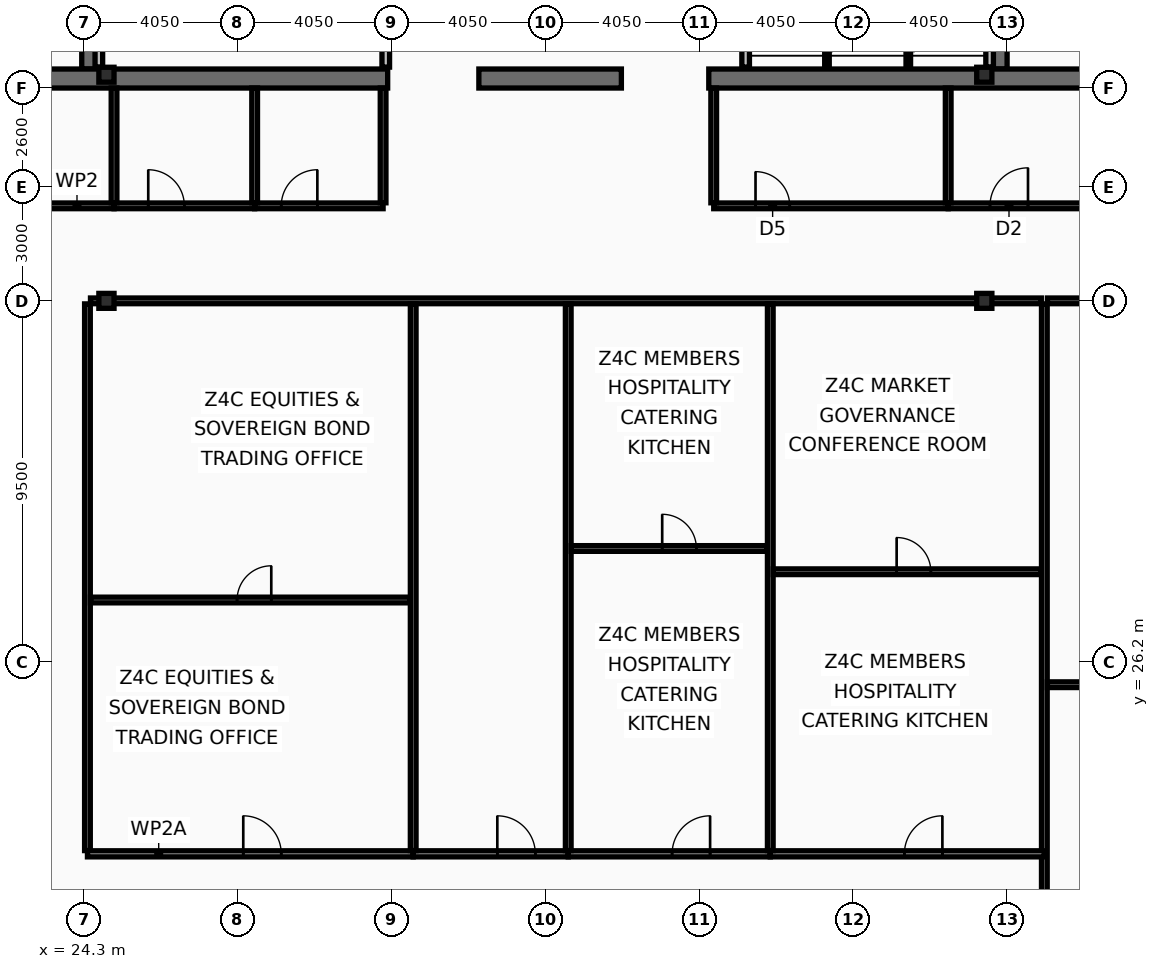
"""IFC4 building model, lengths in metres.
Left out: names, types, materials, properties, quantities, classifications, styles, units other than length and angle.
Written with IfcOpenShell. Run it as: python <this file> out.ifc"""

import sys

from ifc_helpers import new_model, si_unit, direction, frame, frame_2d, origin, origin_2d, place, context, subcontext, project, spatial, rectangle, i_section, extrude, element, fill, save


model = new_model("IFC4")
c1 = context("Model", 3, precision=1e-05, world=origin(), true_north=direction((0.0, 1.0)))
c2 = subcontext(c1, "Body", "Model", "MODEL_VIEW")
j1 = project(units=[si_unit("LENGTHUNIT", "METRE"), si_unit("PLANEANGLEUNIT", "RADIAN")], contexts=[c1])
p1 = place(None, origin())
s1 = spatial("IfcSite", under=j1, at=p1, CompositionType="ELEMENT")
p2 = place(p1, origin())
s2 = spatial("IfcBuilding", under=s1, at=p2, CompositionType="ELEMENT")
p3 = place(p2, frame((0.0, 0.0, 321.8)))
s3 = spatial("IfcBuildingStorey", under=s2, at=p3, CompositionType="ELEMENT", Elevation=321.8)
for number, where, z_axis, x_axis in (
    (1, (24.45, 41.8, 0.0), (0.0, 0.0, 1.0), (0.0, 1.0, 0.0)),
    (2, (48.4, 41.8, 0.0), (0.0, 0.0, 1.0), (0.0, 1.0, 0.0)),
):
    element("IfcWall", number, at=place(p3, frame(where, z_axis=z_axis, x_axis=x_axis)), inside=s3, PredefinedType="SHEAR", context=c2, shape_type="SweptSolid", body=[
        extrude(rectangle(XDim=11.4, YDim=0.4, at=frame_2d((5.7, 0.0))), origin(), (0.0, 0.0, 1.0), 3.44),
    ])
p4 = place(p3, frame((32.3, 41.55, 0.0), z_axis=(0.0, 0.0, 1.0), x_axis=(-1.0, 0.0, 0.0)))
e3 = element("IfcWall", 3, at=p4, inside=s3, PredefinedType="SHEAR", context=c2, shape_type="SweptSolid", body=[
    extrude(rectangle(XDim=11.45, YDim=0.5, at=frame_2d((5.725, 0.0))), origin(), (0.0, 0.0, 1.0), 3.44),
])
p5 = place(p3, frame((38.45, 41.55, 0.0), z_axis=(0.0, 0.0, 1.0), x_axis=(-1.0, 0.0, 0.0)))
e4 = element("IfcWall", 4, at=p5, inside=s3, PredefinedType="SHEAR", context=c2, shape_type="SweptSolid", body=[
    extrude(rectangle(XDim=3.75, YDim=0.5, at=frame_2d((1.875, 0.0))), origin(), (0.0, 0.0, 1.0), 3.44),
])
p6 = place(p3, frame((52.05, 41.55, 0.0), z_axis=(0.0, 0.0, 1.0), x_axis=(-1.0, 0.0, 0.0)))
e5 = element("IfcWall", 5, at=p6, inside=s3, PredefinedType="SHEAR", context=c2, shape_type="SweptSolid", body=[
    extrude(rectangle(XDim=11.3, YDim=0.5, at=frame_2d((5.65, 0.0))), origin(), (0.0, 0.0, 1.0), 3.44),
])
for number, where, z_axis, x_axis in (
    (6, (24.9, 35.7, 0.0), (0.0, 0.0, 1.0), (1.0, 0.0, 0.0)),
    (7, (24.9, 41.65, 0.0), (0.0, 0.0, 1.0), (1.0, 0.0, 0.0)),
    (8, (48.0, 35.7, 0.0), (0.0, 0.0, 1.0), (1.0, 0.0, 0.0)),
    (9, (48.0, 41.65, 0.0), (0.0, 0.0, 1.0), (1.0, 0.0, 0.0)),
):
    element("IfcColumn", number, at=place(p3, frame(where, z_axis=z_axis, x_axis=x_axis)), inside=s3, PredefinedType="COLUMN", context=c2, shape_type="SweptSolid", body=[
        extrude(i_section(OverallWidth=0.399, OverallDepth=0.393, WebThickness=0.023, FlangeThickness=0.037, at=origin_2d()), origin(), (0.0, 0.0, 1.0), 3.6),
    ])
for number, where, z_axis, x_axis in (
    (10, (24.7, 41.85, 0.0), (0.0, 0.0, 1.0), (0.0, 1.0, 0.0)),
    (11, (32.25, 41.85, 0.0), (0.0, 0.0, 1.0), (0.0, 1.0, 0.0)),
):
    element("IfcWall", number, at=place(p3, frame(where, z_axis=z_axis, x_axis=x_axis)), inside=s3, PredefinedType="PARTITIONING", context=c2, shape_type="SweptSolid", body=[
        extrude(rectangle(XDim=2.395, YDim=0.2, at=frame_2d((1.198, 0.0))), origin(), (0.0, 0.0, 1.0), 3.44),
    ])
for number, where, z_axis, x_axis in (
    (12, (41.72, 41.85, 0.0), (0.0, 0.0, 1.0), (0.0, 1.0, 0.0)),
    (13, (48.14, 41.85, 0.0), (0.0, 0.0, 1.0), (0.0, 1.0, 0.0)),
):
    element("IfcWall", number, at=place(p3, frame(where, z_axis=z_axis, x_axis=x_axis)), inside=s3, PredefinedType="PARTITIONING", context=c2, shape_type="SweptSolid", body=[
        extrude(rectangle(XDim=2.4, YDim=0.2, at=frame_2d((1.2, 0.0))), origin(), (0.0, 0.0, 1.0), 3.44),
    ])
for number, where, z_axis, x_axis in (
    (14, (43.86, 41.85, 0.0), (0.0, 0.0, 1.0), (0.0, 1.0, 0.0)),
    (15, (46.0, 41.85, 0.0), (0.0, 0.0, 1.0), (0.0, 1.0, 0.0)),
):
    element("IfcWall", number, at=place(p3, frame(where, z_axis=z_axis, x_axis=x_axis)), inside=s3, PredefinedType="PARTITIONING", context=c2, shape_type="SweptSolid", body=[
        extrude(rectangle(XDim=2.4, YDim=0.12, at=frame_2d((1.2, 0.0))), origin(), (0.0, 0.0, 1.0), 3.44),
    ])
p7 = place(p3, frame((20.95, 38.2, 0.0), z_axis=(0.0, 0.0, 1.0), x_axis=(1.0, 0.0, 0.0)))
e16 = element("IfcWall", 16, at=p7, inside=s3, PredefinedType="PARTITIONING", context=c2, shape_type="SweptSolid", body=[
    extrude(rectangle(XDim=4.15, YDim=0.15, at=frame_2d((2.075, 0.0))), origin(), (0.0, 0.0, 1.0), 2.83),
])
p8 = place(p7, frame((0.9, 0.0, 0.0)))
e17 = element("IfcOpeningElement", 17, at=p8, cuts=e16, PredefinedType="OPENING", context=c2, shape_type="SweptSolid", body=[
    extrude(rectangle(XDim=0.95, YDim=2.05, at=frame_2d((0.475, 1.025))), frame((0.0, 0.085, 0.0), z_axis=(0.0, -1.0, 0.0), x_axis=(1.0, 0.0, 0.0)), (0.0, 0.0, 1.0), 0.17),
])
p9 = place(p3, frame((25.1, 38.2, 0.0), z_axis=(0.0, 0.0, 1.0), x_axis=(1.0, 0.0, 0.0)))
e18 = element("IfcWall", 18, at=p9, inside=s3, PredefinedType="PARTITIONING", context=c2, shape_type="SweptSolid", body=[
    extrude(rectangle(XDim=3.7, YDim=0.15, at=frame_2d((1.85, 0.0))), origin(), (0.0, 0.0, 1.0), 2.83),
])
p10 = place(p9, frame((0.9, 0.0, 0.0)))
e19 = element("IfcOpeningElement", 19, at=p10, cuts=e18, PredefinedType="OPENING", context=c2, shape_type="SweptSolid", body=[
    extrude(rectangle(XDim=0.95, YDim=2.05, at=frame_2d((0.475, 1.025))), frame((0.0, 0.085, 0.0), z_axis=(0.0, -1.0, 0.0), x_axis=(1.0, 0.0, 0.0)), (0.0, 0.0, 1.0), 0.17),
])
p11 = place(p3, frame((28.8, 38.2, 0.0), z_axis=(0.0, 0.0, 1.0), x_axis=(1.0, 0.0, 0.0)))
e20 = element("IfcWall", 20, at=p11, inside=s3, PredefinedType="PARTITIONING", context=c2, shape_type="SweptSolid", body=[
    extrude(rectangle(XDim=3.38, YDim=0.15, at=frame_2d((1.69, 0.0))), origin(), (0.0, 0.0, 1.0), 3.44),
])
p12 = place(p11, frame((0.7, 0.0, 0.0)))
e21 = element("IfcOpeningElement", 21, at=p12, cuts=e20, PredefinedType="OPENING", context=c2, shape_type="SweptSolid", body=[
    extrude(rectangle(XDim=0.95, YDim=2.05, at=frame_2d((0.475, 1.025))), frame((0.0, 0.085, 0.0), z_axis=(0.0, -1.0, 0.0), x_axis=(1.0, 0.0, 0.0)), (0.0, 0.0, 1.0), 0.17),
])
p13 = place(p3, frame((25.1, 38.28, 0.0), z_axis=(0.0, 0.0, 1.0), x_axis=(0.0, 1.0, 0.0)))
e22 = element("IfcWall", 22, at=p13, inside=s3, PredefinedType="PARTITIONING", context=c2, shape_type="SweptSolid", body=[
    extrude(rectangle(XDim=3.02, YDim=0.15, at=frame_2d((1.51, 0.0))), origin(), (0.0, 0.0, 1.0), 2.83),
])
for number, where, z_axis, x_axis in (
    (23, (28.8, 38.28, 0.0), (0.0, 0.0, 1.0), (0.0, 1.0, 0.0)),
    (24, (32.18, 38.28, 0.0), (0.0, 0.0, 1.0), (0.0, 1.0, 0.0)),
):
    element("IfcWall", number, at=place(p3, frame(where, z_axis=z_axis, x_axis=x_axis)), inside=s3, PredefinedType="PARTITIONING", context=c2, shape_type="SweptSolid", body=[
        extrude(rectangle(XDim=3.02, YDim=0.15, at=frame_2d((1.51, 0.0))), origin(), (0.0, 0.0, 1.0), 3.44),
    ])
p14 = place(p3, frame((40.88, 38.2, 0.0), z_axis=(0.0, 0.0, 1.0), x_axis=(1.0, 0.0, 0.0)))
e25 = element("IfcWall", 25, at=p14, inside=s3, PredefinedType="PARTITIONING", context=c2, shape_type="SweptSolid", body=[
    extrude(rectangle(XDim=6.17, YDim=0.15, at=frame_2d((3.085, 0.0))), origin(), (0.0, 0.0, 1.0), 3.44),
])
p15 = place(p14, frame((1.1, 0.0, 0.0)))
e26 = element("IfcOpeningElement", 26, at=p15, cuts=e25, PredefinedType="OPENING", context=c2, shape_type="SweptSolid", body=[
    extrude(rectangle(XDim=0.9, YDim=2.05, at=frame_2d((0.45, 1.025))), frame((0.0, 0.085, 0.0), z_axis=(0.0, -1.0, 0.0), x_axis=(1.0, 0.0, 0.0)), (0.0, 0.0, 1.0), 0.17),
])
p16 = place(p3, frame((47.05, 38.2, 0.0), z_axis=(0.0, 0.0, 1.0), x_axis=(1.0, 0.0, 0.0)))
e27 = element("IfcWall", 27, at=p16, inside=s3, PredefinedType="PARTITIONING", context=c2, shape_type="SweptSolid", body=[
    extrude(rectangle(XDim=4.9, YDim=0.15, at=frame_2d((2.45, 0.0))), origin(), (0.0, 0.0, 1.0), 2.83),
])
p17 = place(p16, frame((1.1, 0.0, 0.0)))
e28 = element("IfcOpeningElement", 28, at=p17, cuts=e27, PredefinedType="OPENING", context=c2, shape_type="SweptSolid", body=[
    extrude(rectangle(XDim=1.0, YDim=2.05, at=frame_2d((0.5, 1.025))), frame((0.0, 0.085, 0.0), z_axis=(0.0, -1.0, 0.0), x_axis=(1.0, 0.0, 0.0)), (0.0, 0.0, 1.0), 0.17),
])
for number, where, z_axis, x_axis in (
    (29, (40.88, 38.28, 0.0), (0.0, 0.0, 1.0), (0.0, 1.0, 0.0)),
    (30, (47.05, 38.28, 0.0), (0.0, 0.0, 1.0), (0.0, 1.0, 0.0)),
):
    element("IfcWall", number, at=place(p3, frame(where, z_axis=z_axis, x_axis=x_axis)), inside=s3, PredefinedType="PARTITIONING", context=c2, shape_type="SweptSolid", body=[
        extrude(rectangle(XDim=3.02, YDim=0.15, at=frame_2d((1.51, 0.0))), origin(), (0.0, 0.0, 1.0), 3.44),
    ])
p18 = place(p3, frame((24.4, 21.235, 0.0), z_axis=(0.0, 0.0, 1.0), x_axis=(0.0, 1.0, 0.0)))
e31 = element("IfcWall", 31, at=p18, inside=s3, PredefinedType="PARTITIONING", context=c2, shape_type="SweptSolid", body=[
    extrude(rectangle(XDim=14.385, YDim=0.15, at=frame_2d((7.192, 0.0))), origin(), (0.0, 0.0, 1.0), 2.83),
])
p19 = place(p3, frame((49.58, 10.665, 0.0), z_axis=(0.0, 0.0, 1.0), x_axis=(0.0, 1.0, 0.0)))
e32 = element("IfcWall", 32, at=p19, inside=s3, PredefinedType="PARTITIONING", context=c2, shape_type="SweptSolid", body=[
    extrude(rectangle(XDim=24.955, YDim=0.15, at=frame_2d((12.478, 0.0))), origin(), (0.0, 0.0, 1.0), 3.07),
])
p20 = place(p19, frame((3.2, 0.0, 0.0)))
e33 = element("IfcOpeningElement", 33, at=p20, cuts=e32, PredefinedType="OPENING", context=c2, shape_type="SweptSolid", body=[
    extrude(rectangle(XDim=1.1, YDim=2.1, at=frame_2d((0.55, 1.05))), frame((0.0, 0.085, 0.0), z_axis=(0.0, -1.0, 0.0), x_axis=(1.0, 0.0, 0.0)), (0.0, 0.0, 1.0), 0.17),
])
p21 = place(p3, frame((24.48, 35.7, 0.0), z_axis=(0.0, 0.0, 1.0), x_axis=(1.0, 0.0, 0.0)))
e34 = element("IfcWall", 34, at=p21, inside=s3, PredefinedType="PARTITIONING", context=c2, shape_type="SweptSolid", body=[
    extrude(rectangle(XDim=25.02, YDim=0.15, at=frame_2d((12.51, 0.0))), origin(), (0.0, 0.0, 1.0), 2.83),
])
p22 = place(p3, frame((49.66, 35.7, 0.0), z_axis=(0.0, 0.0, 1.0), x_axis=(1.0, 0.0, 0.0)))
e35 = element("IfcWall", 35, at=p22, inside=s3, PredefinedType="PARTITIONING", context=c2, shape_type="SweptSolid", body=[
    extrude(rectangle(XDim=11.145, YDim=0.15, at=frame_2d((5.573, 0.0))), origin(), (0.0, 0.0, 1.0), 2.83),
])
p23 = place(p22, frame((2.2, 0.0, 0.0)))
e36 = element("IfcOpeningElement", 36, at=p23, cuts=e35, PredefinedType="OPENING", context=c2, shape_type="SweptSolid", body=[
    extrude(rectangle(XDim=1.0, YDim=2.05, at=frame_2d((0.5, 1.025))), frame((0.0, 0.085, 0.0), z_axis=(0.0, -1.0, 0.0), x_axis=(1.0, 0.0, 0.0)), (0.0, 0.0, 1.0), 0.17),
])
p24 = place(p3, frame((49.66, 25.6, 0.0), z_axis=(0.0, 0.0, 1.0), x_axis=(1.0, 0.0, 0.0)))
e37 = element("IfcWall", 37, at=p24, inside=s3, PredefinedType="PARTITIONING", context=c2, shape_type="SweptSolid", body=[
    extrude(rectangle(XDim=11.145, YDim=0.15, at=frame_2d((5.573, 0.0))), origin(), (0.0, 0.0, 1.0), 2.83),
])
p25 = place(p24, frame((2.2, 0.0, 0.0)))
e38 = element("IfcOpeningElement", 38, at=p25, cuts=e37, PredefinedType="OPENING", context=c2, shape_type="SweptSolid", body=[
    extrude(rectangle(XDim=0.9, YDim=2.05, at=frame_2d((0.45, 1.025))), frame((0.0, 0.085, 0.0), z_axis=(0.0, -1.0, 0.0), x_axis=(1.0, 0.0, 0.0)), (0.0, 0.0, 1.0), 0.17),
])
p26 = place(p3, frame((24.4, 21.15, 0.0), z_axis=(0.0, 0.0, 1.0), x_axis=(1.0, 0.0, 0.0)))
e39 = element("IfcWall", 39, at=p26, inside=s3, PredefinedType="PARTITIONING", context=c2, shape_type="SweptSolid", body=[
    extrude(rectangle(XDim=8.572, YDim=0.16, at=frame_2d((4.286, 0.0))), origin(), (0.0, 0.0, 1.0), 2.83),
])
p27 = place(p26, frame((4.1, 0.0, 0.0)))
e40 = element("IfcOpeningElement", 40, at=p27, cuts=e39, PredefinedType="OPENING", context=c2, shape_type="SweptSolid", body=[
    extrude(rectangle(XDim=1.0, YDim=2.05, at=frame_2d((0.5, 1.025))), frame((0.0, 0.09, 0.0), z_axis=(0.0, -1.0, 0.0), x_axis=(1.0, 0.0, 0.0)), (0.0, 0.0, 1.0), 0.18),
])
p28 = place(p3, frame((24.48, 27.829, 0.0), z_axis=(0.0, 0.0, 1.0), x_axis=(1.0, 0.0, 0.0)))
e41 = element("IfcWall", 41, at=p28, inside=s3, PredefinedType="PARTITIONING", context=c2, shape_type="SweptSolid", body=[
    extrude(rectangle(XDim=8.412, YDim=0.15, at=frame_2d((4.206, 0.0))), origin(), (0.0, 0.0, 1.0), 2.83),
])
p29 = place(p28, frame((3.857, 0.0, 0.0)))
e42 = element("IfcOpeningElement", 42, at=p29, cuts=e41, PredefinedType="OPENING", context=c2, shape_type="SweptSolid", body=[
    extrude(rectangle(XDim=0.9, YDim=2.05, at=frame_2d((0.45, 1.025))), frame((0.0, 0.085, 0.0), z_axis=(0.0, -1.0, 0.0), x_axis=(1.0, 0.0, 0.0)), (0.0, 0.0, 1.0), 0.17),
])
p30 = place(p3, frame((32.972, 21.15, 0.0), z_axis=(0.0, 0.0, 1.0), x_axis=(1.0, 0.0, 0.0)))
e43 = element("IfcWall", 43, at=p30, inside=s3, PredefinedType="PARTITIONING", context=c2, shape_type="SweptSolid", body=[
    extrude(rectangle(XDim=4.08, YDim=0.16, at=frame_2d((2.04, 0.0))), origin(), (0.0, 0.0, 1.0), 3.44),
])
p31 = place(p30, frame((2.214, 0.0, 0.0)))
e44 = element("IfcOpeningElement", 44, at=p31, cuts=e43, PredefinedType="OPENING", context=c2, shape_type="SweptSolid", body=[
    extrude(rectangle(XDim=1.0, YDim=2.05, at=frame_2d((0.5, 1.025))), frame((0.0, 0.09, 0.0), z_axis=(0.0, -1.0, 0.0), x_axis=(1.0, 0.0, 0.0)), (0.0, 0.0, 1.0), 0.18),
])
p32 = place(p3, frame((32.972, 21.235, 0.0), z_axis=(0.0, 0.0, 1.0), x_axis=(0.0, 1.0, 0.0)))
e45 = element("IfcWall", 45, at=p32, inside=s3, PredefinedType="PARTITIONING", context=c2, shape_type="SweptSolid", body=[
    extrude(rectangle(XDim=14.385, YDim=0.15, at=frame_2d((7.192, 0.0))), origin(), (0.0, 0.0, 1.0), 3.07),
])
p33 = place(p3, frame((37.052, 21.15, 0.0), z_axis=(0.0, 0.0, 1.0), x_axis=(1.0, 0.0, 0.0)))
e46 = element("IfcWall", 46, at=p33, inside=s3, PredefinedType="PARTITIONING", context=c2, shape_type="SweptSolid", body=[
    extrude(rectangle(XDim=5.316, YDim=0.16, at=frame_2d((2.658, 0.0))), origin(), (0.0, 0.0, 1.0), 3.44),
])
p34 = place(p33, frame((2.733, 0.0, 0.0)))
e47 = element("IfcOpeningElement", 47, at=p34, cuts=e46, PredefinedType="OPENING", context=c2, shape_type="SweptSolid", body=[
    extrude(rectangle(XDim=1.0, YDim=2.05, at=frame_2d((0.5, 1.025))), frame((0.0, 0.09, 0.0), z_axis=(0.0, -1.0, 0.0), x_axis=(1.0, 0.0, 0.0)), (0.0, 0.0, 1.0), 0.18),
])
p35 = place(p3, frame((37.052, 21.235, 0.0), z_axis=(0.0, 0.0, 1.0), x_axis=(0.0, 1.0, 0.0)))
e48 = element("IfcWall", 48, at=p35, inside=s3, PredefinedType="PARTITIONING", context=c2, shape_type="SweptSolid", body=[
    extrude(rectangle(XDim=14.385, YDim=0.15, at=frame_2d((7.192, 0.0))), origin(), (0.0, 0.0, 1.0), 3.07),
])
p36 = place(p3, frame((37.132, 29.184, 0.0), z_axis=(0.0, 0.0, 1.0), x_axis=(1.0, 0.0, 0.0)))
e49 = element("IfcWall", 49, at=p36, inside=s3, PredefinedType="PARTITIONING", context=c2, shape_type="SweptSolid", body=[
    extrude(rectangle(XDim=5.156, YDim=0.15, at=frame_2d((2.578, 0.0))), origin(), (0.0, 0.0, 1.0), 3.44),
])
p37 = place(p36, frame((2.392, 0.0, 0.0)))
e50 = element("IfcOpeningElement", 50, at=p37, cuts=e49, PredefinedType="OPENING", context=c2, shape_type="SweptSolid", body=[
    extrude(rectangle(XDim=0.9, YDim=2.05, at=frame_2d((0.45, 1.025))), frame((0.0, 0.085, 0.0), z_axis=(0.0, -1.0, 0.0), x_axis=(1.0, 0.0, 0.0)), (0.0, 0.0, 1.0), 0.17),
])
p38 = place(p3, frame((42.368, 21.15, 0.0), z_axis=(0.0, 0.0, 1.0), x_axis=(1.0, 0.0, 0.0)))
e51 = element("IfcWall", 51, at=p38, inside=s3, PredefinedType="PARTITIONING", context=c2, shape_type="SweptSolid", body=[
    extrude(rectangle(XDim=7.212, YDim=0.16, at=frame_2d((3.606, 0.0))), origin(), (0.0, 0.0, 1.0), 2.83),
])
p39 = place(p38, frame((3.529, 0.0, 0.0)))
e52 = element("IfcOpeningElement", 52, at=p39, cuts=e51, PredefinedType="OPENING", context=c2, shape_type="SweptSolid", body=[
    extrude(rectangle(XDim=1.0, YDim=2.05, at=frame_2d((0.5, 1.025))), frame((0.0, 0.09, 0.0), z_axis=(0.0, -1.0, 0.0), x_axis=(1.0, 0.0, 0.0)), (0.0, 0.0, 1.0), 0.18),
])
p40 = place(p3, frame((42.368, 21.235, 0.0), z_axis=(0.0, 0.0, 1.0), x_axis=(0.0, 1.0, 0.0)))
e53 = element("IfcWall", 53, at=p40, inside=s3, PredefinedType="PARTITIONING", context=c2, shape_type="SweptSolid", body=[
    extrude(rectangle(XDim=14.385, YDim=0.15, at=frame_2d((7.192, 0.0))), origin(), (0.0, 0.0, 1.0), 3.07),
])
p41 = place(p3, frame((42.448, 28.572, 0.0), z_axis=(0.0, 0.0, 1.0), x_axis=(1.0, 0.0, 0.0)))
e54 = element("IfcWall", 54, at=p41, inside=s3, PredefinedType="PARTITIONING", context=c2, shape_type="SweptSolid", body=[
    extrude(rectangle(XDim=7.052, YDim=0.15, at=frame_2d((3.526, 0.0))), origin(), (0.0, 0.0, 1.0), 2.83),
])
p42 = place(p41, frame((3.245, 0.0, 0.0)))
e55 = element("IfcOpeningElement", 55, at=p42, cuts=e54, PredefinedType="OPENING", context=c2, shape_type="SweptSolid", body=[
    extrude(rectangle(XDim=0.9, YDim=2.05, at=frame_2d((0.45, 1.025))), frame((0.0, 0.085, 0.0), z_axis=(0.0, -1.0, 0.0), x_axis=(1.0, 0.0, 0.0)), (0.0, 0.0, 1.0), 0.17),
])
p43 = place(p10, origin())
e56 = element("IfcDoor", 56, at=p43, inside=s3, OperationType="SINGLE_SWING_LEFT", PredefinedType="DOOR", context=c2, shape_type="SweptSolid", body=[
    extrude(rectangle(XDim=0.95, YDim=2.05, at=frame_2d((0.475, 1.025))), frame((0.0, 0.025, 0.0), z_axis=(0.0, -1.0, 0.0), x_axis=(1.0, 0.0, 0.0)), (0.0, 0.0, 1.0), 0.05),
])
fill(e19, e56)
p44 = place(p12, origin())
e57 = element("IfcDoor", 57, at=p44, inside=s3, OperationType="SINGLE_SWING_RIGHT", PredefinedType="DOOR", context=c2, shape_type="SweptSolid", body=[
    extrude(rectangle(XDim=0.95, YDim=2.05, at=frame_2d((0.475, 1.025))), frame((0.0, 0.025, 0.0), z_axis=(0.0, -1.0, 0.0), x_axis=(1.0, 0.0, 0.0)), (0.0, 0.0, 1.0), 0.05),
])
fill(e21, e57)
p45 = place(p15, origin())
e58 = element("IfcDoor", 58, at=p45, inside=s3, OperationType="SINGLE_SWING_LEFT", PredefinedType="DOOR", context=c2, shape_type="SweptSolid", body=[
    extrude(rectangle(XDim=0.9, YDim=2.05, at=frame_2d((0.45, 1.025))), frame((0.0, 0.025, 0.0), z_axis=(0.0, -1.0, 0.0), x_axis=(1.0, 0.0, 0.0)), (0.0, 0.0, 1.0), 0.05),
])
fill(e26, e58)
p46 = place(p17, origin())
e59 = element("IfcDoor", 59, at=p46, inside=s3, OperationType="SINGLE_SWING_RIGHT", PredefinedType="DOOR", context=c2, shape_type="SweptSolid", body=[
    extrude(rectangle(XDim=1.0, YDim=2.05, at=frame_2d((0.5, 1.025))), frame((0.0, 0.025, 0.0), z_axis=(0.0, -1.0, 0.0), x_axis=(1.0, 0.0, 0.0)), (0.0, 0.0, 1.0), 0.05),
])
fill(e28, e59)
p47 = place(p27, origin())
e60 = element("IfcDoor", 60, at=p47, inside=s3, OperationType="SINGLE_SWING_LEFT", PredefinedType="DOOR", context=c2, shape_type="SweptSolid", body=[
    extrude(rectangle(XDim=1.0, YDim=2.05, at=frame_2d((0.5, 1.025))), frame((0.0, 0.025, 0.0), z_axis=(0.0, -1.0, 0.0), x_axis=(1.0, 0.0, 0.0)), (0.0, 0.0, 1.0), 0.05),
])
fill(e40, e60)
p48 = place(p29, origin())
e61 = element("IfcDoor", 61, at=p48, inside=s3, OperationType="SINGLE_SWING_RIGHT", PredefinedType="DOOR", context=c2, shape_type="SweptSolid", body=[
    extrude(rectangle(XDim=0.9, YDim=2.05, at=frame_2d((0.45, 1.025))), frame((0.0, 0.025, 0.0), z_axis=(0.0, -1.0, 0.0), x_axis=(1.0, 0.0, 0.0)), (0.0, 0.0, 1.0), 0.05),
])
fill(e42, e61)
p49 = place(p31, origin())
e62 = element("IfcDoor", 62, at=p49, inside=s3, OperationType="SINGLE_SWING_LEFT", PredefinedType="DOOR", context=c2, shape_type="SweptSolid", body=[
    extrude(rectangle(XDim=1.0, YDim=2.05, at=frame_2d((0.5, 1.025))), frame((0.0, 0.025, 0.0), z_axis=(0.0, -1.0, 0.0), x_axis=(1.0, 0.0, 0.0)), (0.0, 0.0, 1.0), 0.05),
])
fill(e44, e62)
p50 = place(p34, origin())
e63 = element("IfcDoor", 63, at=p50, inside=s3, OperationType="SINGLE_SWING_RIGHT", PredefinedType="DOOR", context=c2, shape_type="SweptSolid", body=[
    extrude(rectangle(XDim=1.0, YDim=2.05, at=frame_2d((0.5, 1.025))), frame((0.0, 0.025, 0.0), z_axis=(0.0, -1.0, 0.0), x_axis=(1.0, 0.0, 0.0)), (0.0, 0.0, 1.0), 0.05),
])
fill(e47, e63)
p51 = place(p37, origin())
e64 = element("IfcDoor", 64, at=p51, inside=s3, OperationType="SINGLE_SWING_LEFT", PredefinedType="DOOR", context=c2, shape_type="SweptSolid", body=[
    extrude(rectangle(XDim=0.9, YDim=2.05, at=frame_2d((0.45, 1.025))), frame((0.0, 0.025, 0.0), z_axis=(0.0, -1.0, 0.0), x_axis=(1.0, 0.0, 0.0)), (0.0, 0.0, 1.0), 0.05),
])
fill(e50, e64)
p52 = place(p39, origin())
e65 = element("IfcDoor", 65, at=p52, inside=s3, OperationType="SINGLE_SWING_RIGHT", PredefinedType="DOOR", context=c2, shape_type="SweptSolid", body=[
    extrude(rectangle(XDim=1.0, YDim=2.05, at=frame_2d((0.5, 1.025))), frame((0.0, 0.025, 0.0), z_axis=(0.0, -1.0, 0.0), x_axis=(1.0, 0.0, 0.0)), (0.0, 0.0, 1.0), 0.05),
])
fill(e52, e65)
p53 = place(p42, origin())
e66 = element("IfcDoor", 66, at=p53, inside=s3, OperationType="SINGLE_SWING_LEFT", PredefinedType="DOOR", context=c2, shape_type="SweptSolid", body=[
    extrude(rectangle(XDim=0.9, YDim=2.05, at=frame_2d((0.45, 1.025))), frame((0.0, 0.025, 0.0), z_axis=(0.0, -1.0, 0.0), x_axis=(1.0, 0.0, 0.0)), (0.0, 0.0, 1.0), 0.05),
])
fill(e55, e66)
save(model, sys.argv[1])
